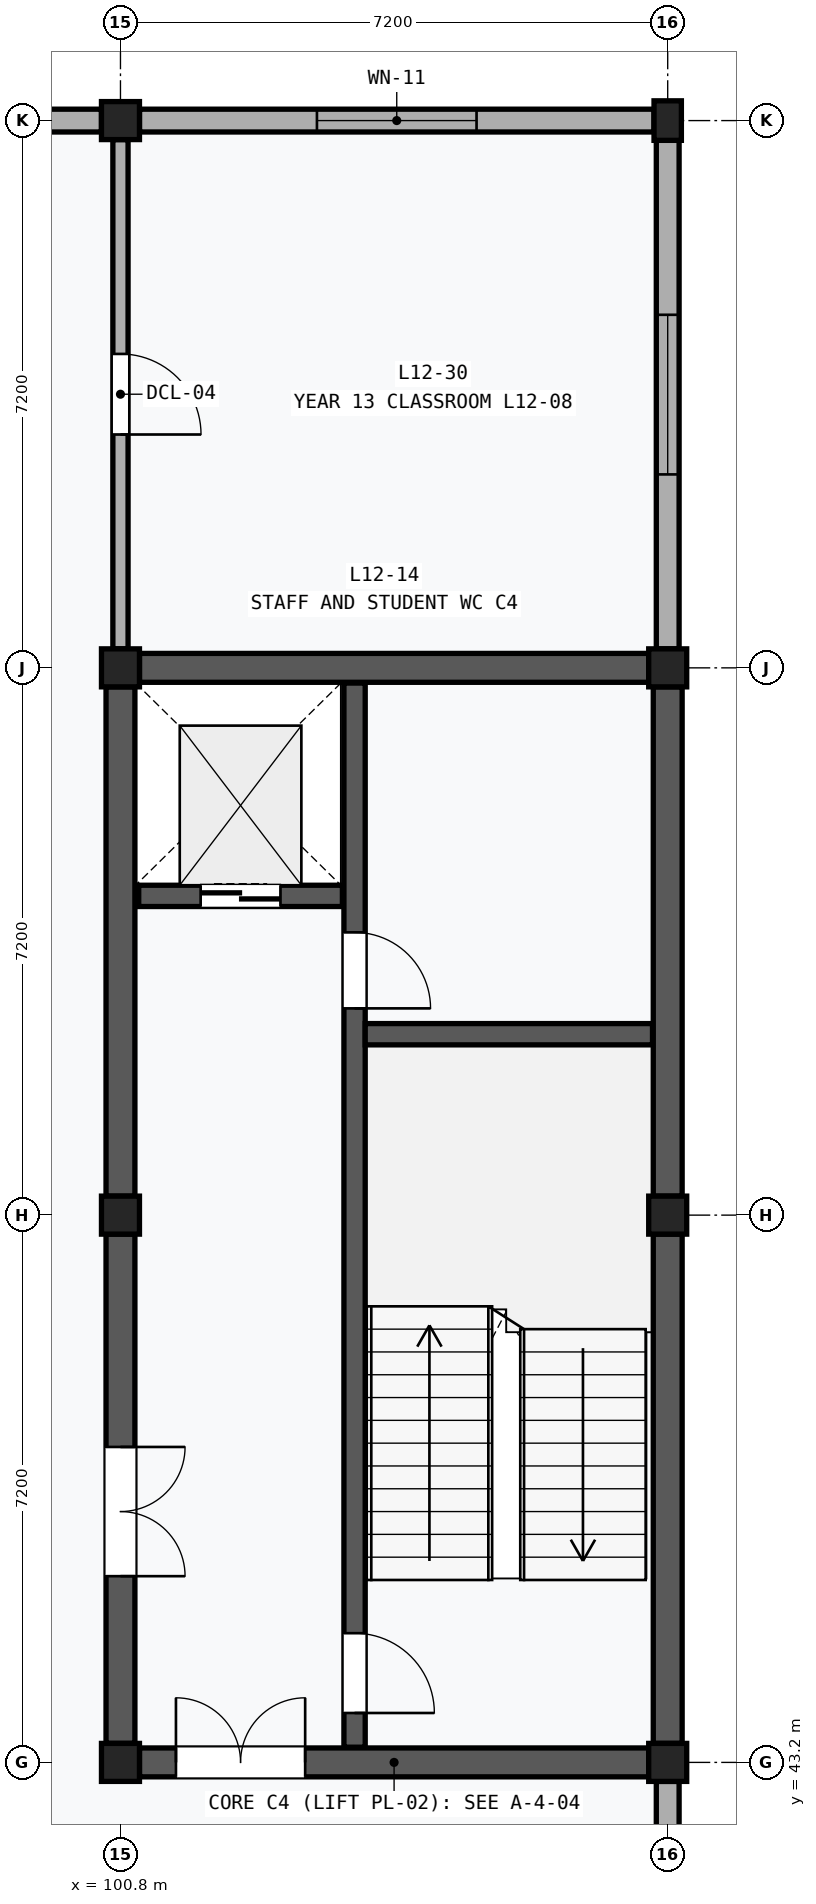
"""IFC4 building model, lengths in metres.
Left out: names, types, materials, properties, quantities, classifications, styles, units other than length and angle.
Written with IfcOpenShell. Run it as: python <this file> out.ifc"""

import sys

from ifc_helpers import new_model, si_unit, direction, frame, frame_2d, origin, origin_2d, place, context, subcontext, project, spatial, rectangle, extrude, element, fill, save


model = new_model("IFC4")
c1 = context("Model", 3, precision=1e-05, world=origin(), true_north=direction((0.0, 1.0)))
c2 = subcontext(c1, "Body", "Model", "MODEL_VIEW")
j1 = project(units=[si_unit("LENGTHUNIT", "METRE"), si_unit("PLANEANGLEUNIT", "RADIAN")], contexts=[c1])
p1 = place(None, origin())
s1 = spatial("IfcSite", under=j1, at=p1, CompositionType="ELEMENT")
p2 = place(p1, origin())
s2 = spatial("IfcBuilding", under=s1, at=p2, CompositionType="ELEMENT")
p3 = place(p2, frame((0.0, 0.0, 51.0)))
s3 = spatial("IfcBuildingStorey", under=s2, at=p3, CompositionType="ELEMENT", Elevation=51.0)
for number, where, z_axis, x_axis in (
    (1, (100.8, 43.2, 0.0), (0.0, 0.0, 1.0), (1.0, 0.0, 0.0)),
    (2, (100.8, 50.4, 0.0), (0.0, 0.0, 1.0), (1.0, 0.0, 0.0)),
    (3, (100.8, 57.6, 0.0), (0.0, 0.0, 1.0), (1.0, 0.0, 0.0)),
    (4, (100.8, 64.8, 0.0), (0.0, 0.0, 1.0), (1.0, 0.0, 0.0)),
    (5, (108.0, 43.2, 0.0), (0.0, 0.0, 1.0), (1.0, 0.0, 0.0)),
    (6, (108.0, 50.4, 0.0), (0.0, 0.0, 1.0), (1.0, 0.0, 0.0)),
    (7, (108.0, 57.6, 0.0), (0.0, 0.0, 1.0), (1.0, 0.0, 0.0)),
):
    element("IfcColumn", number, at=place(p3, frame(where, z_axis=z_axis, x_axis=x_axis)), inside=s3, PredefinedType="COLUMN", context=c2, shape_type="SweptSolid", body=[
        extrude(rectangle(XDim=0.5, YDim=0.5, at=origin_2d()), origin(), (0.0, 0.0, 1.0), 4.0),
    ])
p4 = place(p3, frame((108.0, 64.8, 0.0), z_axis=(0.0, 0.0, 1.0), x_axis=(1.0, 0.0, 0.0)))
e8 = element("IfcColumn", 8, at=p4, inside=s3, PredefinedType="PILASTER", context=c2, shape_type="SweptSolid", body=[
    extrude(rectangle(XDim=0.36, YDim=0.52, at=origin_2d()), origin(), (0.0, 0.0, 1.0), 4.0),
])
p5 = place(p3, frame((93.85, 64.8, 0.0), z_axis=(0.0, 0.0, 1.0), x_axis=(1.0, 0.0, 0.0)))
e9 = element("IfcWall", 9, at=p5, inside=s3, PredefinedType="SOLIDWALL", context=c2, shape_type="SweptSolid", body=[
    extrude(rectangle(XDim=6.7, YDim=0.3, at=frame_2d((3.35, 0.0))), origin(), (0.0, 0.0, 1.0), 3.17),
])
p6 = place(p5, frame((2.45, 0.0, 0.85)))
e10 = element("IfcOpeningElement", 10, at=p6, cuts=e9, PredefinedType="OPENING", context=c2, shape_type="SweptSolid", body=[
    extrude(rectangle(XDim=1.8, YDim=2.0, at=frame_2d((0.9, 1.0))), frame((0.0, 0.162, 0.0), z_axis=(0.0, -1.0, 0.0), x_axis=(1.0, 0.0, 0.0)), (0.0, 0.0, 1.0), 0.324),
])
p7 = place(p3, frame((108.0, 36.26, 0.0), z_axis=(0.0, 0.0, 1.0), x_axis=(0.0, 1.0, 0.0)))
e11 = element("IfcWall", 11, at=p7, inside=s3, PredefinedType="SOLIDWALL", context=c2, shape_type="SweptSolid", body=[
    extrude(rectangle(XDim=6.69, YDim=0.3, at=frame_2d((3.345, 0.0))), origin(), (0.0, 0.0, 1.0), 3.17),
])
p8 = place(p3, frame((101.05, 64.8, 0.0), z_axis=(0.0, 0.0, 1.0), x_axis=(1.0, 0.0, 0.0)))
e12 = element("IfcWall", 12, at=p8, inside=s3, PredefinedType="SOLIDWALL", context=c2, shape_type="SweptSolid", body=[
    extrude(rectangle(XDim=6.77, YDim=0.3, at=frame_2d((3.385, 0.0))), origin(), (0.0, 0.0, 1.0), 3.17),
])
p9 = place(p8, frame((2.335, 0.0, 0.85)))
e13 = element("IfcOpeningElement", 13, at=p9, cuts=e12, PredefinedType="OPENING", context=c2, shape_type="SweptSolid", body=[
    extrude(rectangle(XDim=2.1, YDim=2.0, at=frame_2d((1.05, 1.0))), frame((0.0, 0.162, 0.0), z_axis=(0.0, -1.0, 0.0), x_axis=(1.0, 0.0, 0.0)), (0.0, 0.0, 1.0), 0.324),
])
p10 = place(p3, frame((108.0, 57.85, 0.0), z_axis=(0.0, 0.0, 1.0), x_axis=(0.0, 1.0, 0.0)))
e14 = element("IfcWall", 14, at=p10, inside=s3, PredefinedType="SOLIDWALL", context=c2, shape_type="SweptSolid", body=[
    extrude(rectangle(XDim=6.69, YDim=0.3, at=frame_2d((3.345, 0.0))), origin(), (0.0, 0.0, 1.0), 3.17),
])
p11 = place(p10, frame((2.295, 0.0, 0.85)))
e15 = element("IfcOpeningElement", 15, at=p11, cuts=e14, PredefinedType="OPENING", context=c2, shape_type="SweptSolid", body=[
    extrude(rectangle(XDim=2.1, YDim=2.0, at=frame_2d((1.05, 1.0))), frame((0.0, 0.162, 0.0), z_axis=(0.0, -1.0, 0.0), x_axis=(1.0, 0.0, 0.0)), (0.0, 0.0, 1.0), 0.324),
])
p12 = place(p3, frame((100.8, 43.45, 0.0), z_axis=(0.0, 0.0, 1.0), x_axis=(0.0, 1.0, 0.0)))
e16 = element("IfcWall", 16, at=p12, inside=s3, PredefinedType="SHEAR", context=c2, shape_type="SweptSolid", body=[
    extrude(rectangle(XDim=6.7, YDim=0.38, at=frame_2d((3.35, 0.0))), origin(), (0.0, 0.0, 1.0), 3.09),
])
p13 = place(p12, frame((2.2, 0.0, 0.0)))
e17 = element("IfcOpeningElement", 17, at=p13, cuts=e16, PredefinedType="OPENING", context=c2, shape_type="SweptSolid", body=[
    extrude(rectangle(XDim=1.7, YDim=2.25, at=frame_2d((0.85, 1.125))), frame((0.0, 0.202, 0.0), z_axis=(0.0, -1.0, 0.0), x_axis=(1.0, 0.0, 0.0)), (0.0, 0.0, 1.0), 0.404),
])
p14 = place(p3, frame((100.8, 50.65, 0.0), z_axis=(0.0, 0.0, 1.0), x_axis=(0.0, 1.0, 0.0)))
e18 = element("IfcWall", 18, at=p14, inside=s3, PredefinedType="SHEAR", context=c2, shape_type="SweptSolid", body=[
    extrude(rectangle(XDim=6.7, YDim=0.38, at=frame_2d((3.35, 0.0))), origin(), (0.0, 0.0, 1.0), 3.09),
])
p15 = place(p3, frame((108.0, 43.45, 0.0), z_axis=(0.0, 0.0, 1.0), x_axis=(0.0, 1.0, 0.0)))
e19 = element("IfcWall", 19, at=p15, inside=s3, PredefinedType="SHEAR", context=c2, shape_type="SweptSolid", body=[
    extrude(rectangle(XDim=6.7, YDim=0.38, at=frame_2d((3.35, 0.0))), origin(), (0.0, 0.0, 1.0), 3.17),
])
p16 = place(p3, frame((108.0, 50.65, 0.0), z_axis=(0.0, 0.0, 1.0), x_axis=(0.0, 1.0, 0.0)))
e20 = element("IfcWall", 20, at=p16, inside=s3, PredefinedType="SHEAR", context=c2, shape_type="SweptSolid", body=[
    extrude(rectangle(XDim=6.7, YDim=0.38, at=frame_2d((3.35, 0.0))), origin(), (0.0, 0.0, 1.0), 3.17),
])
p17 = place(p3, frame((101.05, 43.2, 0.0), z_axis=(0.0, 0.0, 1.0), x_axis=(1.0, 0.0, 0.0)))
e21 = element("IfcWall", 21, at=p17, inside=s3, PredefinedType="SHEAR", context=c2, shape_type="SweptSolid", body=[
    extrude(rectangle(XDim=6.7, YDim=0.38, at=frame_2d((3.35, 0.0))), origin(), (0.0, 0.0, 1.0), 3.09),
])
p18 = place(p17, frame((0.48, 0.0, 0.0)))
e22 = element("IfcOpeningElement", 22, at=p18, cuts=e21, PredefinedType="OPENING", context=c2, shape_type="SweptSolid", body=[
    extrude(rectangle(XDim=1.7, YDim=2.25, at=frame_2d((0.85, 1.125))), frame((0.0, 0.202, 0.0), z_axis=(0.0, -1.0, 0.0), x_axis=(1.0, 0.0, 0.0)), (0.0, 0.0, 1.0), 0.404),
])
p19 = place(p3, frame((101.05, 57.6, 0.0), z_axis=(0.0, 0.0, 1.0), x_axis=(1.0, 0.0, 0.0)))
e23 = element("IfcWall", 23, at=p19, inside=s3, PredefinedType="SHEAR", context=c2, shape_type="SweptSolid", body=[
    extrude(rectangle(XDim=6.7, YDim=0.38, at=frame_2d((3.35, 0.0))), origin(), (0.0, 0.0, 1.0), 3.09),
])
p20 = place(p3, frame((103.88, 43.4, 0.0), z_axis=(0.0, 0.0, 1.0), x_axis=(0.0, 1.0, 0.0)))
e24 = element("IfcWall", 24, at=p20, inside=s3, PredefinedType="SHEAR", context=c2, shape_type="SweptSolid", body=[
    extrude(rectangle(XDim=14.0, YDim=0.28, at=frame_2d((7.0, 0.0))), origin(), (0.0, 0.0, 1.0), 3.78),
])
p21 = place(p20, frame((0.45, 0.0, 0.0)))
e25 = element("IfcOpeningElement", 25, at=p21, cuts=e24, PredefinedType="OPENING", context=c2, shape_type="SweptSolid", body=[
    extrude(rectangle(XDim=1.05, YDim=2.15, at=frame_2d((0.525, 1.075))), frame((0.0, 0.152, 0.0), z_axis=(0.0, -1.0, 0.0), x_axis=(1.0, 0.0, 0.0)), (0.0, 0.0, 1.0), 0.304),
])
p22 = place(p20, frame((9.72, 0.0, 0.0)))
e26 = element("IfcOpeningElement", 26, at=p22, cuts=e24, PredefinedType="OPENING", context=c2, shape_type="SweptSolid", body=[
    extrude(rectangle(XDim=1.0, YDim=2.15, at=frame_2d((0.5, 1.075))), frame((0.0, 0.152, 0.0), z_axis=(0.0, -1.0, 0.0), x_axis=(1.0, 0.0, 0.0)), (0.0, 0.0, 1.0), 0.304),
])
p23 = place(p3, frame((104.02, 52.78, 0.0), z_axis=(0.0, 0.0, 1.0), x_axis=(1.0, 0.0, 0.0)))
e27 = element("IfcWall", 27, at=p23, inside=s3, PredefinedType="SHEAR", context=c2, shape_type="SweptSolid", body=[
    extrude(rectangle(XDim=3.78, YDim=0.28, at=frame_2d((1.89, 0.0))), origin(), (0.0, 0.0, 1.0), 3.78),
])
p24 = place(p3, frame((101.04, 54.6, 0.0), z_axis=(0.0, 0.0, 1.0), x_axis=(1.0, 0.0, 0.0)))
e28 = element("IfcWall", 28, at=p24, inside=s3, PredefinedType="SHEAR", context=c2, shape_type="SweptSolid", body=[
    extrude(rectangle(XDim=2.68, YDim=0.28, at=frame_2d((1.34, 0.0))), origin(), (0.0, 0.0, 1.0), 3.78),
])
p25 = place(p24, frame((0.815, 0.0, 0.0)))
e29 = element("IfcOpeningElement", 29, at=p25, cuts=e28, PredefinedType="OPENING", context=c2, shape_type="SweptSolid", body=[
    extrude(rectangle(XDim=1.05, YDim=2.2, at=frame_2d((0.525, 1.1))), frame((0.0, 0.152, 0.0), z_axis=(0.0, -1.0, 0.0), x_axis=(1.0, 0.0, 0.0)), (0.0, 0.0, 1.0), 0.304),
])
p26 = place(p3, frame((100.8, 57.85, 0.0), z_axis=(0.0, 0.0, 1.0), x_axis=(0.0, 1.0, 0.0)))
e30 = element("IfcWall", 30, at=p26, inside=s3, PredefinedType="PARTITIONING", context=c2, shape_type="SweptSolid", body=[
    extrude(rectangle(XDim=6.7, YDim=0.2, at=frame_2d((3.35, 0.0))), origin(), (0.0, 0.0, 1.0), 3.09),
])
p27 = place(p26, frame((2.82, 0.0, 0.0)))
e31 = element("IfcOpeningElement", 31, at=p27, cuts=e30, PredefinedType="OPENING", context=c2, shape_type="SweptSolid", body=[
    extrude(rectangle(XDim=1.06, YDim=2.16, at=frame_2d((0.53, 1.08))), frame((0.0, 0.112, 0.0), z_axis=(0.0, -1.0, 0.0), x_axis=(1.0, 0.0, 0.0)), (0.0, 0.0, 1.0), 0.224),
])
p28 = place(p9, origin())
e32 = element("IfcWindow", 32, at=p28, inside=s3, PartitioningType="SINGLE_PANEL", PredefinedType="WINDOW", context=c2, shape_type="SweptSolid", body=[
    extrude(rectangle(XDim=2.1, YDim=2.0, at=frame_2d((1.05, 1.0))), frame((0.0, 0.03, 0.0), z_axis=(0.0, -1.0, 0.0), x_axis=(1.0, 0.0, 0.0)), (0.0, 0.0, 1.0), 0.06),
])
fill(e13, e32)
p29 = place(p11, origin())
e33 = element("IfcWindow", 33, at=p29, inside=s3, PartitioningType="SINGLE_PANEL", PredefinedType="WINDOW", context=c2, shape_type="SweptSolid", body=[
    extrude(rectangle(XDim=2.1, YDim=2.0, at=frame_2d((1.05, 1.0))), frame((0.0, 0.03, 0.0), z_axis=(0.0, -1.0, 0.0), x_axis=(1.0, 0.0, 0.0)), (0.0, 0.0, 1.0), 0.06),
])
fill(e15, e33)
p30 = place(p13, frame((1.7, 0.0, 0.0), z_axis=(0.0, 0.0, 1.0), x_axis=(-1.0, 0.0, 0.0)))
e34 = element("IfcDoor", 34, at=p30, inside=s3, OperationType="DOUBLE_DOOR_SINGLE_SWING", PredefinedType="DOOR", context=c2, shape_type="SweptSolid", body=[
    extrude(rectangle(XDim=1.7, YDim=2.25, at=frame_2d((0.85, 1.125))), frame((0.0, 0.025, 0.0), z_axis=(0.0, -1.0, 0.0), x_axis=(1.0, 0.0, 0.0)), (0.0, 0.0, 1.0), 0.05),
])
fill(e17, e34)
p31 = place(p18, origin())
e35 = element("IfcDoor", 35, at=p31, inside=s3, OperationType="DOUBLE_DOOR_SINGLE_SWING", PredefinedType="DOOR", context=c2, shape_type="SweptSolid", body=[
    extrude(rectangle(XDim=1.7, YDim=2.25, at=frame_2d((0.85, 1.125))), frame((0.0, 0.025, 0.0), z_axis=(0.0, -1.0, 0.0), x_axis=(1.0, 0.0, 0.0)), (0.0, 0.0, 1.0), 0.05),
])
fill(e22, e35)
p32 = place(p21, frame((1.05, 0.0, 0.0), z_axis=(0.0, 0.0, 1.0), x_axis=(-1.0, 0.0, 0.0)))
e36 = element("IfcDoor", 36, at=p32, inside=s3, OperationType="SINGLE_SWING_RIGHT", PredefinedType="DOOR", context=c2, shape_type="SweptSolid", body=[
    extrude(rectangle(XDim=1.05, YDim=2.15, at=frame_2d((0.525, 1.075))), frame((0.0, 0.025, 0.0), z_axis=(0.0, -1.0, 0.0), x_axis=(1.0, 0.0, 0.0)), (0.0, 0.0, 1.0), 0.05),
])
fill(e25, e36)
p33 = place(p22, frame((1.0, 0.0, 0.0), z_axis=(0.0, 0.0, 1.0), x_axis=(-1.0, 0.0, 0.0)))
e37 = element("IfcDoor", 37, at=p33, inside=s3, OperationType="SINGLE_SWING_RIGHT", PredefinedType="DOOR", context=c2, shape_type="SweptSolid", body=[
    extrude(rectangle(XDim=1.0, YDim=2.15, at=frame_2d((0.5, 1.075))), frame((0.0, 0.025, 0.0), z_axis=(0.0, -1.0, 0.0), x_axis=(1.0, 0.0, 0.0)), (0.0, 0.0, 1.0), 0.05),
])
fill(e26, e37)
p34 = place(p25, frame((1.05, 0.0, 0.0), z_axis=(0.0, 0.0, 1.0), x_axis=(-1.0, 0.0, 0.0)))
e38 = element("IfcDoor", 38, at=p34, inside=s3, OperationType="DOUBLE_DOOR_SLIDING", PredefinedType="DOOR", context=c2, shape_type="SweptSolid", body=[
    extrude(rectangle(XDim=1.05, YDim=2.2, at=frame_2d((0.525, 1.1))), frame((0.0, 0.025, 0.0), z_axis=(0.0, -1.0, 0.0), x_axis=(1.0, 0.0, 0.0)), (0.0, 0.0, 1.0), 0.05),
])
fill(e29, e38)
p35 = place(p27, frame((1.06, 0.0, 0.0), z_axis=(0.0, 0.0, 1.0), x_axis=(-1.0, 0.0, 0.0)))
e39 = element("IfcDoor", 39, at=p35, inside=s3, OperationType="SINGLE_SWING_RIGHT", PredefinedType="DOOR", context=c2, shape_type="SweptSolid", body=[
    extrude(rectangle(XDim=1.06, YDim=2.16, at=frame_2d((0.53, 1.08))), frame((0.0, 0.025, 0.0), z_axis=(0.0, -1.0, 0.0), x_axis=(1.0, 0.0, 0.0)), (0.0, 0.0, 1.0), 0.05),
])
fill(e31, e39)
save(model, sys.argv[1])
